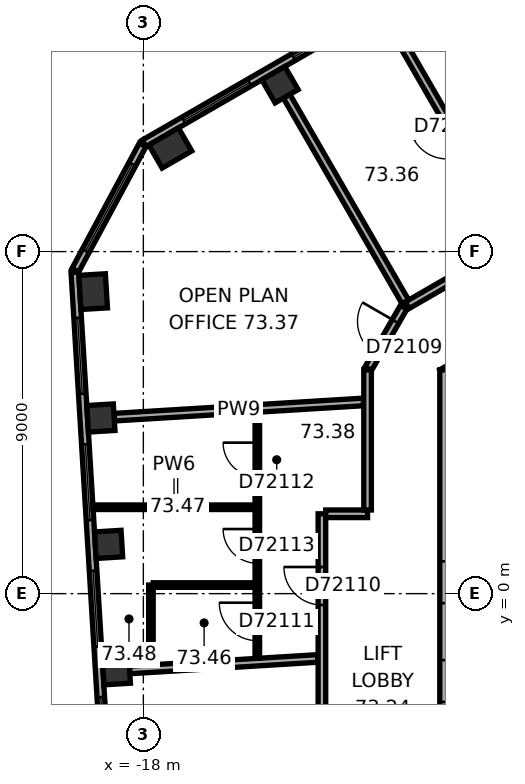
"""IFC4 building model, lengths in metres.
Left out: names, types, materials, properties, quantities, classifications, styles, units other than length and angle.
Written with IfcOpenShell. Run it as: python <this file> out.ifc"""

import sys

from ifc_helpers import new_model, si_unit, direction, frame, frame_2d, origin, origin_2d, place, context, subcontext, project, spatial, rectangle, extrude, element, fill, save


model = new_model("IFC4")
c1 = context("Model", 3, precision=1e-05, world=origin(), true_north=direction((0.0, 1.0)))
c2 = subcontext(c1, "Body", "Model", "MODEL_VIEW")
j1 = project(units=[si_unit("LENGTHUNIT", "METRE"), si_unit("PLANEANGLEUNIT", "RADIAN")], contexts=[c1])
p1 = place(None, origin())
s1 = spatial("IfcSite", under=j1, at=p1, CompositionType="ELEMENT")
p2 = place(p1, origin())
s2 = spatial("IfcBuilding", under=s1, at=p2, CompositionType="ELEMENT")
p3 = place(p2, frame((0.0, 0.0, 296.8)))
s3 = spatial("IfcBuildingStorey", under=s2, at=p3, CompositionType="ELEMENT", Elevation=296.8)
p4 = place(p3, frame((-14.406, 13.391, 0.0), z_axis=(0.0, 0.0, 1.0), x_axis=(-0.866025403784, -0.5, 0.0)))
e1 = element("IfcColumn", 1, at=p4, inside=s3, PredefinedType="COLUMN", context=c2, shape_type="SweptSolid", body=[
    extrude(rectangle(XDim=0.7, YDim=0.7, at=origin_2d()), origin(), (0.0, 0.0, 1.0), 3.7),
])
for number, where, z_axis, x_axis in (
    (2, (-17.291, 11.726, 0.0), (0.0, 0.0, 1.0), (-0.866, -0.5, 0.0)),
    (3, (-19.321, 7.947, 0.0), (0.0, 0.0, 1.0), (0.061, -0.998, 0.0)),
):
    element("IfcColumn", number, at=place(p3, frame(where, z_axis=z_axis, x_axis=x_axis)), inside=s3, PredefinedType="COLUMN", context=c2, shape_type="SweptSolid", body=[
        extrude(rectangle(XDim=0.9, YDim=0.7, at=origin_2d()), origin(), (0.0, 0.0, 1.0), 3.7),
    ])
for number, where, z_axis, x_axis in (
    (4, (-19.118, 4.621, 0.0), (0.0, 0.0, 1.0), (0.061, -0.998, 0.0)),
    (5, (-18.914, 1.296, 0.0), (0.0, 0.0, 1.0), (0.061, -0.998, 0.0)),
    (6, (-18.711, -2.03, 0.0), (0.0, 0.0, 1.0), (0.061, -0.998, 0.0)),
):
    element("IfcColumn", number, at=place(p3, frame(where, z_axis=z_axis, x_axis=x_axis)), inside=s3, PredefinedType="COLUMN", context=c2, shape_type="SweptSolid", body=[
        extrude(rectangle(XDim=0.7, YDim=0.7, at=origin_2d()), origin(), (0.0, 0.0, 1.0), 3.7),
    ])
p5 = place(p3, frame((0.175, 11.475, 0.0), z_axis=(0.0, 0.0, 1.0), x_axis=(-0.866026453023, -0.499998182661, 0.0)))
e7 = element("IfcWall", 7, at=p5, inside=s3, PredefinedType="SHEAR", context=c2, shape_type="SweptSolid", body=[
    extrude(rectangle(XDim=11.778, YDim=0.7, at=frame_2d((5.889, 0.0))), origin(), (0.0, 0.0, 1.0), 3.7),
])
p6 = place(p5, frame((6.089, 0.0, 0.0)))
e8 = element("IfcOpeningElement", 8, at=p6, cuts=e7, PredefinedType="OPENING", context=c2, shape_type="SweptSolid", body=[
    extrude(rectangle(XDim=1.5, YDim=2.1, at=frame_2d((0.75, 1.05))), frame((0.0, 0.36, 0.0), z_axis=(0.0, -1.0, 0.0), x_axis=(1.0, 0.0, 0.0)), (0.0, 0.0, 1.0), 0.72),
])
p7 = place(p5, frame((2.939, 0.0, 0.0)))
e9 = element("IfcOpeningElement", 9, at=p7, cuts=e7, PredefinedType="OPENING", context=c2, shape_type="SweptSolid", body=[
    extrude(rectangle(XDim=0.9, YDim=2.1, at=frame_2d((0.45, 1.05))), frame((0.0, 0.36, 0.0), z_axis=(0.0, -1.0, 0.0), x_axis=(1.0, 0.0, 0.0)), (0.0, 0.0, 1.0), 0.72),
])
p8 = place(p3, frame((-9.85, 5.889, 0.0), z_axis=(0.0, 0.0, 1.0), x_axis=(0.0, -1.0, 0.0)))
e10 = element("IfcWall", 10, at=p8, inside=s3, PredefinedType="SHEAR", context=c2, shape_type="SweptSolid", body=[
    extrude(rectangle(XDim=11.778, YDim=0.7, at=frame_2d((5.889, 0.0))), origin(), (0.0, 0.0, 1.0), 3.7),
])
p9 = place(p8, frame((5.039, 0.0, 0.0)))
e11 = element("IfcOpeningElement", 11, at=p9, cuts=e10, PredefinedType="OPENING", context=c2, shape_type="SweptSolid", body=[
    extrude(rectangle(XDim=1.1, YDim=2.1, at=frame_2d((0.55, 1.05))), frame((0.0, 0.36, 0.0), z_axis=(0.0, -1.0, 0.0), x_axis=(1.0, 0.0, 0.0)), (0.0, 0.0, 1.0), 0.72),
])
p10 = place(p8, frame((7.639, 0.0, 0.0)))
e12 = element("IfcOpeningElement", 12, at=p10, cuts=e10, PredefinedType="OPENING", context=c2, shape_type="SweptSolid", body=[
    extrude(rectangle(XDim=1.1, YDim=2.1, at=frame_2d((0.55, 1.05))), frame((0.0, 0.36, 0.0), z_axis=(0.0, -1.0, 0.0), x_axis=(1.0, 0.0, 0.0)), (0.0, 0.0, 1.0), 0.72),
])
p11 = place(p3, frame((-2.624, 20.713, 0.0), z_axis=(0.0, 0.0, 1.0), x_axis=(-0.866026460444, -0.499998169808, 0.0)))
e13 = element("IfcWall", 13, at=p11, inside=s3, PredefinedType="STANDARD", context=c2, shape_type="SweptSolid", body=[
    extrude(rectangle(XDim=17.731, YDim=0.2, at=frame_2d((8.866, 0.0))), origin(), (0.0, 0.0, 1.0), 3.7),
])
p12 = place(p11, frame((1.203, 0.0, 0.9)))
e14 = element("IfcOpeningElement", 14, at=p12, cuts=e13, PredefinedType="OPENING", context=c2, shape_type="SweptSolid", body=[
    extrude(rectangle(XDim=2.0, YDim=2.0, at=frame_2d((1.0, 1.0))), frame((0.0, 0.11, 0.0), z_axis=(0.0, -1.0, 0.0), x_axis=(1.0, 0.0, 0.0)), (0.0, 0.0, 1.0), 0.22),
])
p13 = place(p11, frame((4.535, 0.0, 0.9)))
e15 = element("IfcOpeningElement", 15, at=p13, cuts=e13, PredefinedType="OPENING", context=c2, shape_type="SweptSolid", body=[
    extrude(rectangle(XDim=2.0, YDim=2.0, at=frame_2d((1.0, 1.0))), frame((0.0, 0.11, 0.0), z_axis=(0.0, -1.0, 0.0), x_axis=(1.0, 0.0, 0.0)), (0.0, 0.0, 1.0), 0.22),
])
p14 = place(p11, frame((7.867, 0.0, 0.9)))
e16 = element("IfcOpeningElement", 16, at=p14, cuts=e13, PredefinedType="OPENING", context=c2, shape_type="SweptSolid", body=[
    extrude(rectangle(XDim=2.0, YDim=2.0, at=frame_2d((1.0, 1.0))), frame((0.0, 0.11, 0.0), z_axis=(0.0, -1.0, 0.0), x_axis=(1.0, 0.0, 0.0)), (0.0, 0.0, 1.0), 0.22),
])
p15 = place(p11, frame((11.198, 0.0, 0.9)))
e17 = element("IfcOpeningElement", 17, at=p15, cuts=e13, PredefinedType="OPENING", context=c2, shape_type="SweptSolid", body=[
    extrude(rectangle(XDim=2.0, YDim=2.0, at=frame_2d((1.0, 1.0))), frame((0.0, 0.11, 0.0), z_axis=(0.0, -1.0, 0.0), x_axis=(1.0, 0.0, 0.0)), (0.0, 0.0, 1.0), 0.22),
])
p16 = place(p11, frame((14.53, 0.0, 0.9)))
e18 = element("IfcOpeningElement", 18, at=p16, cuts=e13, PredefinedType="OPENING", context=c2, shape_type="SweptSolid", body=[
    extrude(rectangle(XDim=2.0, YDim=2.0, at=frame_2d((1.0, 1.0))), frame((0.0, 0.11, 0.0), z_axis=(0.0, -1.0, 0.0), x_axis=(1.0, 0.0, 0.0)), (0.0, 0.0, 1.0), 0.22),
])
p17 = place(p3, frame((-18.018, 11.808, 0.0), z_axis=(0.0, 0.0, 1.0), x_axis=(-0.473318619185, -0.880891301315, 0.0)))
e19 = element("IfcWall", 19, at=p17, inside=s3, PredefinedType="STANDARD", context=c2, shape_type="SweptSolid", body=[
    extrude(rectangle(XDim=3.747, YDim=0.2, at=frame_2d((1.874, 0.0))), origin(), (0.0, 0.0, 1.0), 3.7),
])
p18 = place(p17, frame((0.573, 0.0, 0.9)))
e20 = element("IfcOpeningElement", 20, at=p18, cuts=e19, PredefinedType="OPENING", context=c2, shape_type="SweptSolid", body=[
    extrude(rectangle(XDim=2.6, YDim=2.0, at=frame_2d((1.3, 1.0))), frame((0.0, 0.11, 0.0), z_axis=(0.0, -1.0, 0.0), x_axis=(1.0, 0.0, 0.0)), (0.0, 0.0, 1.0), 0.22),
])
p19 = place(p3, frame((-19.803, 8.454, 0.0), z_axis=(0.0, 0.0, 1.0), x_axis=(0.061036717565, -0.998135521414, 0.0)))
e21 = element("IfcWall", 21, at=p19, inside=s3, PredefinedType="STANDARD", context=c2, shape_type="SweptSolid", body=[
    extrude(rectangle(XDim=17.731, YDim=0.2, at=frame_2d((8.866, 0.0))), origin(), (0.0, 0.0, 1.0), 3.7),
])
p20 = place(p19, frame((1.202, 0.0, 0.9)))
e22 = element("IfcOpeningElement", 22, at=p20, cuts=e21, PredefinedType="OPENING", context=c2, shape_type="SweptSolid", body=[
    extrude(rectangle(XDim=2.0, YDim=2.0, at=frame_2d((1.0, 1.0))), frame((0.0, 0.11, 0.0), z_axis=(0.0, -1.0, 0.0), x_axis=(1.0, 0.0, 0.0)), (0.0, 0.0, 1.0), 0.22),
])
p21 = place(p19, frame((4.533, 0.0, 0.9)))
e23 = element("IfcOpeningElement", 23, at=p21, cuts=e21, PredefinedType="OPENING", context=c2, shape_type="SweptSolid", body=[
    extrude(rectangle(XDim=2.0, YDim=2.0, at=frame_2d((1.0, 1.0))), frame((0.0, 0.11, 0.0), z_axis=(0.0, -1.0, 0.0), x_axis=(1.0, 0.0, 0.0)), (0.0, 0.0, 1.0), 0.22),
])
p22 = place(p19, frame((7.865, 0.0, 0.9)))
e24 = element("IfcOpeningElement", 24, at=p22, cuts=e21, PredefinedType="OPENING", context=c2, shape_type="SweptSolid", body=[
    extrude(rectangle(XDim=2.0, YDim=2.0, at=frame_2d((1.0, 1.0))), frame((0.0, 0.11, 0.0), z_axis=(0.0, -1.0, 0.0), x_axis=(1.0, 0.0, 0.0)), (0.0, 0.0, 1.0), 0.22),
])
p23 = place(p19, frame((11.197, 0.0, 0.9)))
e25 = element("IfcOpeningElement", 25, at=p23, cuts=e21, PredefinedType="OPENING", context=c2, shape_type="SweptSolid", body=[
    extrude(rectangle(XDim=2.0, YDim=2.0, at=frame_2d((1.0, 1.0))), frame((0.0, 0.11, 0.0), z_axis=(0.0, -1.0, 0.0), x_axis=(1.0, 0.0, 0.0)), (0.0, 0.0, 1.0), 0.22),
])
p24 = place(p19, frame((14.528, 0.0, 0.9)))
e26 = element("IfcOpeningElement", 26, at=p24, cuts=e21, PredefinedType="OPENING", context=c2, shape_type="SweptSolid", body=[
    extrude(rectangle(XDim=2.0, YDim=2.0, at=frame_2d((1.0, 1.0))), frame((0.0, 0.11, 0.0), z_axis=(0.0, -1.0, 0.0), x_axis=(1.0, 0.0, 0.0)), (0.0, 0.0, 1.0), 0.22),
])
p25 = place(p3, frame((-19.324, 2.273, 0.0), z_axis=(0.0, 0.0, 1.0), x_axis=(1.0, 0.0, 0.0)))
e27 = element("IfcWall", 27, at=p25, inside=s3, PredefinedType="PARTITIONING", context=c2, shape_type="SweptSolid", body=[
    extrude(rectangle(XDim=4.263, YDim=0.12, at=frame_2d((2.132, 0.0))), origin(), (0.0, 0.0, 1.0), 3.35),
])
p26 = place(p3, frame((-18.768, 4.643, 0.0), z_axis=(0.0, 0.0, 1.0), x_axis=(0.99813496285, 0.0610458511, 0.0)))
e28 = element("IfcWall", 28, at=p26, inside=s3, PredefinedType="PARTITIONING", context=c2, shape_type="SweptSolid", body=[
    extrude(rectangle(XDim=6.571, YDim=0.2, at=frame_2d((3.285, 0.0))), origin(), (0.0, 0.0, 1.0), 3.35),
])
p27 = place(p3, frame((-18.362, -2.008, 0.0), z_axis=(0.0, 0.0, 1.0), x_axis=(0.998135748374, 0.061033005966, 0.0)))
e29 = element("IfcWall", 29, at=p27, inside=s3, PredefinedType="PARTITIONING", context=c2, shape_type="SweptSolid", body=[
    extrude(rectangle(XDim=4.96, YDim=0.2, at=frame_2d((2.48, 0.0))), origin(), (0.0, 0.0, 1.0), 3.35),
])
p28 = place(p3, frame((-17.801, 0.226, 0.0), z_axis=(0.0, 0.0, 1.0), x_axis=(0.0, -1.0, 0.0)))
e30 = element("IfcWall", 30, at=p28, inside=s3, PredefinedType="PARTITIONING", context=c2, shape_type="SweptSolid", body=[
    extrude(rectangle(XDim=2.1, YDim=0.12, at=frame_2d((1.05, 0.0))), origin(), (0.0, 0.0, 1.0), 3.35),
])
p29 = place(p3, frame((-15.061, 0.226, 0.0), z_axis=(0.0, 0.0, 1.0), x_axis=(-1.0, 0.0, 0.0)))
e31 = element("IfcWall", 31, at=p29, inside=s3, PredefinedType="PARTITIONING", context=c2, shape_type="SweptSolid", body=[
    extrude(rectangle(XDim=2.68, YDim=0.12, at=frame_2d((1.34, 0.0))), origin(), (0.0, 0.0, 1.0), 3.35),
])
p30 = place(p3, frame((-15.001, 4.773, 0.0), z_axis=(0.0, 0.0, 1.0), x_axis=(0.0, -1.0, 0.0)))
e32 = element("IfcWall", 32, at=p30, inside=s3, PredefinedType="PARTITIONING", context=c2, shape_type="SweptSolid", body=[
    extrude(rectangle(XDim=6.476, YDim=0.12, at=frame_2d((3.238, 0.0))), origin(), (0.0, 0.0, 1.0), 3.35),
])
p31 = place(p30, frame((5.011, 0.0, 0.0)))
e33 = element("IfcOpeningElement", 33, at=p31, cuts=e32, PredefinedType="OPENING", context=c2, shape_type="SweptSolid", body=[
    extrude(rectangle(XDim=1.0, YDim=2.1, at=frame_2d((0.5, 1.05))), frame((0.0, 0.07, 0.0), z_axis=(0.0, -1.0, 0.0), x_axis=(1.0, 0.0, 0.0)), (0.0, 0.0, 1.0), 0.14),
])
p32 = place(p30, frame((0.8, 0.0, 0.0)))
e34 = element("IfcOpeningElement", 34, at=p32, cuts=e32, PredefinedType="OPENING", context=c2, shape_type="SweptSolid", body=[
    extrude(rectangle(XDim=0.9, YDim=2.1, at=frame_2d((0.45, 1.05))), frame((0.0, 0.07, 0.0), z_axis=(0.0, -1.0, 0.0), x_axis=(1.0, 0.0, 0.0)), (0.0, 0.0, 1.0), 0.14),
])
p33 = place(p30, frame((3.073, 0.0, 0.0)))
e35 = element("IfcOpeningElement", 35, at=p33, cuts=e32, PredefinedType="OPENING", context=c2, shape_type="SweptSolid", body=[
    extrude(rectangle(XDim=0.9, YDim=2.1, at=frame_2d((0.45, 1.05))), frame((0.0, 0.07, 0.0), z_axis=(0.0, -1.0, 0.0), x_axis=(1.0, 0.0, 0.0)), (0.0, 0.0, 1.0), 0.14),
])
p34 = place(p3, frame((-14.23, 13.088, 0.0), z_axis=(0.0, 0.0, 1.0), x_axis=(0.500004234368, -0.866022959057, 0.0)))
e36 = element("IfcWall", 36, at=p34, inside=s3, PredefinedType="PARTITIONING", context=c2, shape_type="SweptSolid", body=[
    extrude(rectangle(XDim=6.25, YDim=0.2, at=frame_2d((3.125, 0.0))), origin(), (0.0, 0.0, 1.0), 3.35),
])
p35 = place(p3, frame((-13.301, 2.101, 0.0), z_axis=(0.0, 0.0, 1.0), x_axis=(0.0, -1.0, 0.0)))
e37 = element("IfcWall", 37, at=p35, inside=s3, PredefinedType="PARTITIONING", context=c2, shape_type="SweptSolid", body=[
    extrude(rectangle(XDim=6.102, YDim=0.2, at=frame_2d((3.051, 0.0))), origin(), (0.0, 0.0, 1.0), 3.35),
])
p36 = place(p35, frame((1.4, 0.0, 0.0)))
e38 = element("IfcOpeningElement", 38, at=p36, cuts=e37, PredefinedType="OPENING", context=c2, shape_type="SweptSolid", body=[
    extrude(rectangle(XDim=1.0, YDim=2.1, at=frame_2d((0.5, 1.05))), frame((0.0, 0.11, 0.0), z_axis=(0.0, -1.0, 0.0), x_axis=(1.0, 0.0, 0.0)), (0.0, 0.0, 1.0), 0.22),
])
p37 = place(p3, frame((-12.1, 2.101, 0.0), z_axis=(0.0, 0.0, 1.0), x_axis=(-1.0, 0.0, 0.0)))
e39 = element("IfcWall", 39, at=p37, inside=s3, PredefinedType="PARTITIONING", context=c2, shape_type="SweptSolid", body=[
    extrude(rectangle(XDim=1.101, YDim=0.2, at=frame_2d((0.55, 0.0))), origin(), (0.0, 0.0, 1.0), 3.35),
])
p38 = place(p3, frame((-12.1, 5.889, 0.0), z_axis=(0.0, 0.0, 1.0), x_axis=(0.0, -1.0, 0.0)))
e40 = element("IfcWall", 40, at=p38, inside=s3, PredefinedType="PARTITIONING", context=c2, shape_type="SweptSolid", body=[
    extrude(rectangle(XDim=3.688, YDim=0.2, at=frame_2d((1.844, 0.0))), origin(), (0.0, 0.0, 1.0), 3.35),
])
p39 = place(p3, frame((-11.345, 14.754, 0.0), z_axis=(0.0, 0.0, 1.0), x_axis=(0.500005339912, -0.866022320763, 0.0)))
e41 = element("IfcWall", 41, at=p39, inside=s3, PredefinedType="PARTITIONING", context=c2, shape_type="SweptSolid", body=[
    extrude(rectangle(XDim=6.35, YDim=0.2, at=frame_2d((3.175, 0.0))), origin(), (0.0, 0.0, 1.0), 3.35),
])
p40 = place(p39, frame((2.675, 0.0, 0.0)))
e42 = element("IfcOpeningElement", 42, at=p40, cuts=e41, PredefinedType="OPENING", context=c2, shape_type="SweptSolid", body=[
    extrude(rectangle(XDim=1.0, YDim=2.1, at=frame_2d((0.5, 1.05))), frame((0.0, 0.11, 0.0), z_axis=(0.0, -1.0, 0.0), x_axis=(1.0, 0.0, 0.0)), (0.0, 0.0, 1.0), 0.22),
])
p41 = place(p3, frame((-11.15, 7.534, 0.0), z_axis=(0.0, 0.0, 1.0), x_axis=(-0.500063286585, -0.865988862174, 0.0)))
e43 = element("IfcWall", 43, at=p41, inside=s3, PredefinedType="PARTITIONING", context=c2, shape_type="SweptSolid", body=[
    extrude(rectangle(XDim=1.86, YDim=0.2, at=frame_2d((0.93, 0.0))), origin(), (0.0, 0.0, 1.0), 3.35),
])
p42 = place(p41, frame((0.43, 0.0, 0.0)))
e44 = element("IfcOpeningElement", 44, at=p42, cuts=e43, PredefinedType="OPENING", context=c2, shape_type="SweptSolid", body=[
    extrude(rectangle(XDim=1.0, YDim=2.1, at=frame_2d((0.5, 1.05))), frame((0.0, 0.11, 0.0), z_axis=(0.0, -1.0, 0.0), x_axis=(1.0, 0.0, 0.0)), (0.0, 0.0, 1.0), 0.22),
])
p43 = place(p3, frame((-8.257, 9.205, 0.0), z_axis=(0.0, 0.0, 1.0), x_axis=(-0.866030838723, -0.499990586292, 0.0)))
e45 = element("IfcWall", 45, at=p43, inside=s3, PredefinedType="PARTITIONING", context=c2, shape_type="SweptSolid", body=[
    extrude(rectangle(XDim=3.231, YDim=0.2, at=frame_2d((1.616, 0.0))), origin(), (0.0, 0.0, 1.0), 3.35),
])
p44 = place(p15, origin())
e46 = element("IfcWindow", 46, at=p44, inside=s3, PartitioningType="SINGLE_PANEL", PredefinedType="WINDOW", context=c2, shape_type="SweptSolid", body=[
    extrude(rectangle(XDim=2.0, YDim=2.0, at=frame_2d((1.0, 1.0))), frame((0.0, 0.03, 0.0), z_axis=(0.0, -1.0, 0.0), x_axis=(1.0, 0.0, 0.0)), (0.0, 0.0, 1.0), 0.06),
])
fill(e17, e46)
p45 = place(p16, origin())
e47 = element("IfcWindow", 47, at=p45, inside=s3, PartitioningType="SINGLE_PANEL", PredefinedType="WINDOW", context=c2, shape_type="SweptSolid", body=[
    extrude(rectangle(XDim=2.0, YDim=2.0, at=frame_2d((1.0, 1.0))), frame((0.0, 0.03, 0.0), z_axis=(0.0, -1.0, 0.0), x_axis=(1.0, 0.0, 0.0)), (0.0, 0.0, 1.0), 0.06),
])
fill(e18, e47)
p46 = place(p18, origin())
e48 = element("IfcWindow", 48, at=p46, inside=s3, PartitioningType="SINGLE_PANEL", PredefinedType="WINDOW", context=c2, shape_type="SweptSolid", body=[
    extrude(rectangle(XDim=2.6, YDim=2.0, at=frame_2d((1.3, 1.0))), frame((0.0, 0.03, 0.0), z_axis=(0.0, -1.0, 0.0), x_axis=(1.0, 0.0, 0.0)), (0.0, 0.0, 1.0), 0.06),
])
fill(e20, e48)
p47 = place(p20, origin())
e49 = element("IfcWindow", 49, at=p47, inside=s3, PartitioningType="SINGLE_PANEL", PredefinedType="WINDOW", context=c2, shape_type="SweptSolid", body=[
    extrude(rectangle(XDim=2.0, YDim=2.0, at=frame_2d((1.0, 1.0))), frame((0.0, 0.03, 0.0), z_axis=(0.0, -1.0, 0.0), x_axis=(1.0, 0.0, 0.0)), (0.0, 0.0, 1.0), 0.06),
])
fill(e22, e49)
p48 = place(p21, origin())
e50 = element("IfcWindow", 50, at=p48, inside=s3, PartitioningType="SINGLE_PANEL", PredefinedType="WINDOW", context=c2, shape_type="SweptSolid", body=[
    extrude(rectangle(XDim=2.0, YDim=2.0, at=frame_2d((1.0, 1.0))), frame((0.0, 0.03, 0.0), z_axis=(0.0, -1.0, 0.0), x_axis=(1.0, 0.0, 0.0)), (0.0, 0.0, 1.0), 0.06),
])
fill(e23, e50)
p49 = place(p22, origin())
e51 = element("IfcWindow", 51, at=p49, inside=s3, PartitioningType="SINGLE_PANEL", PredefinedType="WINDOW", context=c2, shape_type="SweptSolid", body=[
    extrude(rectangle(XDim=2.0, YDim=2.0, at=frame_2d((1.0, 1.0))), frame((0.0, 0.03, 0.0), z_axis=(0.0, -1.0, 0.0), x_axis=(1.0, 0.0, 0.0)), (0.0, 0.0, 1.0), 0.06),
])
fill(e24, e51)
p50 = place(p23, origin())
e52 = element("IfcWindow", 52, at=p50, inside=s3, PartitioningType="SINGLE_PANEL", PredefinedType="WINDOW", context=c2, shape_type="SweptSolid", body=[
    extrude(rectangle(XDim=2.0, YDim=2.0, at=frame_2d((1.0, 1.0))), frame((0.0, 0.03, 0.0), z_axis=(0.0, -1.0, 0.0), x_axis=(1.0, 0.0, 0.0)), (0.0, 0.0, 1.0), 0.06),
])
fill(e25, e52)
p51 = place(p42, origin())
e53 = element("IfcDoor", 53, at=p51, inside=s3, OperationType="SINGLE_SWING_LEFT", PredefinedType="DOOR", context=c2, shape_type="SweptSolid", body=[
    extrude(rectangle(XDim=1.0, YDim=2.1, at=frame_2d((0.5, 1.05))), frame((0.0, 0.025, 0.0), z_axis=(0.0, -1.0, 0.0), x_axis=(1.0, 0.0, 0.0)), (0.0, 0.0, 1.0), 0.05),
])
fill(e44, e53)
p52 = place(p36, origin())
e54 = element("IfcDoor", 54, at=p52, inside=s3, OperationType="SINGLE_SWING_LEFT", PredefinedType="DOOR", context=c2, shape_type="SweptSolid", body=[
    extrude(rectangle(XDim=1.0, YDim=2.1, at=frame_2d((0.5, 1.05))), frame((0.0, 0.025, 0.0), z_axis=(0.0, -1.0, 0.0), x_axis=(1.0, 0.0, 0.0)), (0.0, 0.0, 1.0), 0.05),
])
fill(e38, e54)
p53 = place(p31, origin())
e55 = element("IfcDoor", 55, at=p53, inside=s3, OperationType="SINGLE_SWING_LEFT", PredefinedType="DOOR", context=c2, shape_type="SweptSolid", body=[
    extrude(rectangle(XDim=1.0, YDim=2.1, at=frame_2d((0.5, 1.05))), frame((0.0, 0.025, 0.0), z_axis=(0.0, -1.0, 0.0), x_axis=(1.0, 0.0, 0.0)), (0.0, 0.0, 1.0), 0.05),
])
fill(e33, e55)
p54 = place(p32, origin())
e56 = element("IfcDoor", 56, at=p54, inside=s3, OperationType="SINGLE_SWING_LEFT", PredefinedType="DOOR", context=c2, shape_type="SweptSolid", body=[
    extrude(rectangle(XDim=0.9, YDim=2.1, at=frame_2d((0.45, 1.05))), frame((0.0, 0.025, 0.0), z_axis=(0.0, -1.0, 0.0), x_axis=(1.0, 0.0, 0.0)), (0.0, 0.0, 1.0), 0.05),
])
fill(e34, e56)
p55 = place(p33, origin())
e57 = element("IfcDoor", 57, at=p55, inside=s3, OperationType="SINGLE_SWING_LEFT", PredefinedType="DOOR", context=c2, shape_type="SweptSolid", body=[
    extrude(rectangle(XDim=0.9, YDim=2.1, at=frame_2d((0.45, 1.05))), frame((0.0, 0.025, 0.0), z_axis=(0.0, -1.0, 0.0), x_axis=(1.0, 0.0, 0.0)), (0.0, 0.0, 1.0), 0.05),
])
fill(e35, e57)
save(model, sys.argv[1])
